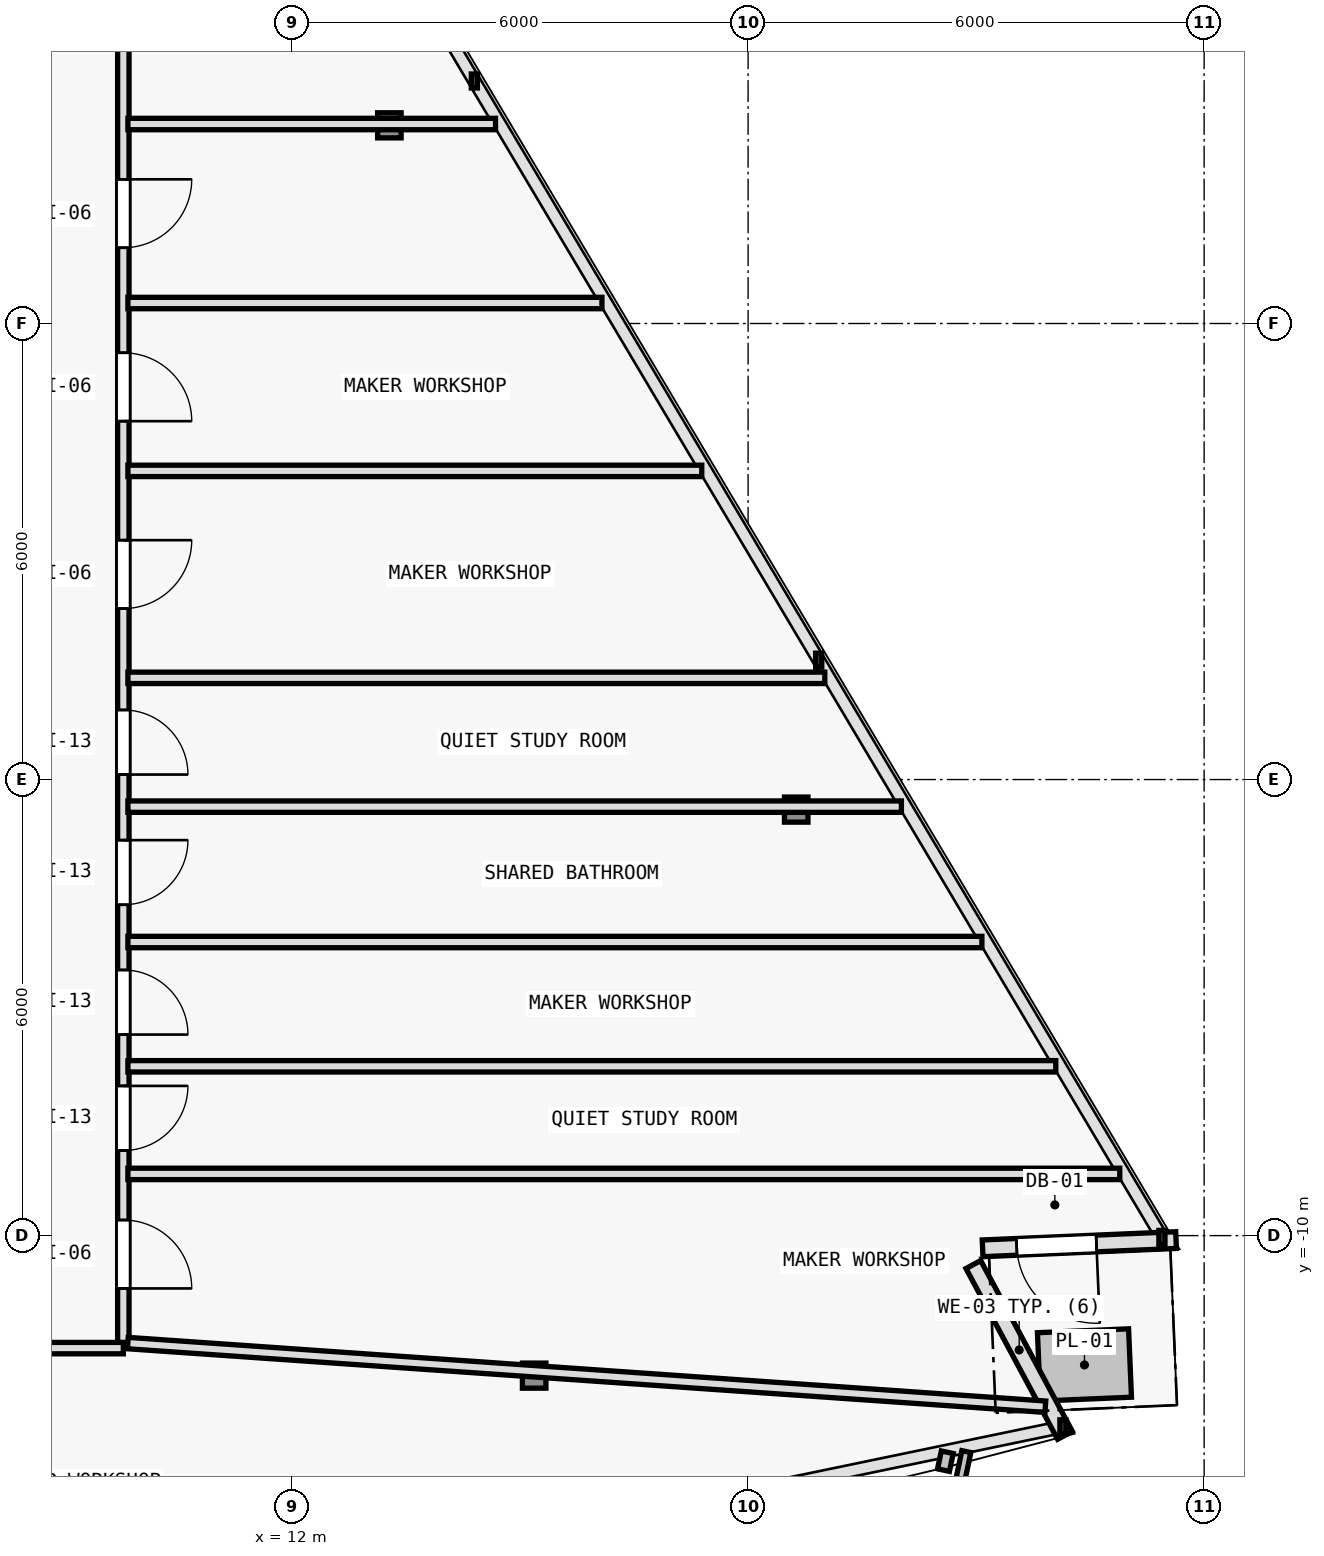
"""IFC4 building model, lengths in metres.
Left out: names, types, materials, properties, quantities, classifications, styles, units other than length and angle.
Written with IfcOpenShell. Run it as: python <this file> out.ifc"""

import sys

from ifc_helpers import new_model, si_unit, direction, frame, frame_2d, origin, origin_2d, place, context, subcontext, project, spatial, rectangle, i_section, extrude, element, fill, save


model = new_model("IFC4")
c1 = context("Model", 3, precision=1e-05, world=origin(), true_north=direction((0.0, 1.0)))
c2 = subcontext(c1, "Body", "Model", "MODEL_VIEW")
j1 = project(units=[si_unit("LENGTHUNIT", "METRE"), si_unit("PLANEANGLEUNIT", "RADIAN")], contexts=[c1])
p1 = place(None, origin())
s1 = spatial("IfcSite", under=j1, at=p1, CompositionType="ELEMENT")
p2 = place(p1, origin())
s2 = spatial("IfcBuilding", under=s1, at=p2, CompositionType="ELEMENT")
p3 = place(p2, frame((0.0, 0.0, 286.8)))
s3 = spatial("IfcBuildingStorey", under=s2, at=p3, CompositionType="ELEMENT", Elevation=286.8)
p4 = place(p3, frame((15.185, -11.842, 0.005), z_axis=(-0.020662834962, 0.033509136961, 0.999224792022), x_axis=(-0.851183725565, -0.524867855115, 0.0)))
e1 = element("IfcColumn", 1, at=p4, inside=s3, PredefinedType="COLUMN", context=c2, shape_type="SweptSolid", body=[
    extrude(i_section(OverallWidth=0.309, OverallDepth=0.33, WebThickness=0.011, FlangeThickness=0.019, FilletRadius=0.027, at=origin_2d()), origin(), (0.0, 0.0, 1.0), 3.592),
])
p5 = place(p3, frame((18.633, -4.395, 0.005), z_axis=(-0.026105663043, 0.021618752208, 0.999425396871), x_axis=(-0.637813971185, -0.770190455771, 0.0)))
e2 = element("IfcColumn", 2, at=p5, inside=s3, PredefinedType="COLUMN", context=c2, shape_type="SweptSolid", body=[
    extrude(i_section(OverallWidth=0.309, OverallDepth=0.33, WebThickness=0.011, FlangeThickness=0.019, FilletRadius=0.027, at=origin_2d()), origin(), (0.0, 0.0, 1.0), 3.591),
])
p6 = place(p3, frame((13.28, 4.607, 0.005), z_axis=(-0.018906041, 0.009521027842, 0.999775930718), x_axis=(-0.449781931574, -0.893138406984, 0.0)))
e3 = element("IfcColumn", 3, at=p6, inside=s3, PredefinedType="COLUMN", context=c2, shape_type="SweptSolid", body=[
    extrude(i_section(OverallWidth=0.309, OverallDepth=0.33, WebThickness=0.011, FlangeThickness=0.019, FilletRadius=0.027, at=origin_2d()), origin(), (0.0, 0.0, 1.0), 3.59),
])
p7 = place(p3, frame((20.964, -10.381, 0.0), z_axis=(0.0, 0.0, 1.0), x_axis=(0.472728849632, -0.881207940685, 0.0)))
e4 = element("IfcWall", 4, at=p7, inside=s3, PredefinedType="SOLIDWALL", context=c2, shape_type="SweptSolid", body=[
    extrude(rectangle(XDim=2.55, YDim=0.22, at=frame_2d((1.275, 0.0))), origin(), (0.0, 0.0, 1.0), 3.35),
])
p8 = place(p3, frame((23.631, -10.059, 0.0), z_axis=(0.0, 0.0, 1.0), x_axis=(-0.999098350703, -0.042455690107, 0.0)))
e5 = element("IfcWall", 5, at=p8, inside=s3, PredefinedType="SOLIDWALL", context=c2, shape_type="SweptSolid", body=[
    extrude(rectangle(XDim=2.547, YDim=0.22, at=frame_2d((1.274, 0.0))), origin(), (0.0, 0.0, 1.0), 3.35),
])
p9 = place(p8, frame((1.049, 0.0, 0.0)))
e6 = element("IfcOpeningElement", 6, at=p9, cuts=e5, PredefinedType="OPENING", context=c2, shape_type="SweptSolid", body=[
    extrude(rectangle(XDim=1.05, YDim=2.15, at=frame_2d((0.525, 1.075))), frame((0.0, 0.12, 0.0), z_axis=(0.0, -1.0, 0.0), x_axis=(1.0, 0.0, 0.0)), (0.0, 0.0, 1.0), 0.24),
])
p10 = place(p3, frame((9.78, 8.226, 0.0), z_axis=(0.0, 0.0, 1.0), x_axis=(0.0, -1.0, 0.0)))
e7 = element("IfcWall", 7, at=p10, inside=s3, PredefinedType="PARTITIONING", context=c2, shape_type="SweptSolid", body=[
    extrude(rectangle(XDim=19.706, YDim=0.15, at=frame_2d((9.853, 0.0))), origin(), (0.0, 0.0, 1.0), 2.825),
])
p11 = place(p10, frame((18.021, 0.0, 0.0)))
e8 = element("IfcOpeningElement", 8, at=p11, cuts=e7, PredefinedType="OPENING", context=c2, shape_type="SweptSolid", body=[
    extrude(rectangle(XDim=0.9, YDim=2.1, at=frame_2d((0.45, 1.05))), frame((0.0, 0.085, 0.0), z_axis=(0.0, -1.0, 0.0), x_axis=(1.0, 0.0, 0.0)), (0.0, 0.0, 1.0), 0.17),
])
p12 = place(p10, frame((16.256, 0.0, 0.0)))
e9 = element("IfcOpeningElement", 9, at=p12, cuts=e7, PredefinedType="OPENING", context=c2, shape_type="SweptSolid", body=[
    extrude(rectangle(XDim=0.85, YDim=2.1, at=frame_2d((0.425, 1.05))), frame((0.0, 0.085, 0.0), z_axis=(0.0, -1.0, 0.0), x_axis=(1.0, 0.0, 0.0)), (0.0, 0.0, 1.0), 0.17),
])
p13 = place(p10, frame((14.731, 0.0, 0.0)))
e10 = element("IfcOpeningElement", 10, at=p13, cuts=e7, PredefinedType="OPENING", context=c2, shape_type="SweptSolid", body=[
    extrude(rectangle(XDim=0.85, YDim=2.1, at=frame_2d((0.425, 1.05))), frame((0.0, 0.085, 0.0), z_axis=(0.0, -1.0, 0.0), x_axis=(1.0, 0.0, 0.0)), (0.0, 0.0, 1.0), 0.17),
])
p14 = place(p10, frame((13.023, 0.0, 0.0)))
e11 = element("IfcOpeningElement", 11, at=p14, cuts=e7, PredefinedType="OPENING", context=c2, shape_type="SweptSolid", body=[
    extrude(rectangle(XDim=0.85, YDim=2.1, at=frame_2d((0.425, 1.05))), frame((0.0, 0.085, 0.0), z_axis=(0.0, -1.0, 0.0), x_axis=(1.0, 0.0, 0.0)), (0.0, 0.0, 1.0), 0.17),
])
p15 = place(p10, frame((11.31, 0.0, 0.0)))
e12 = element("IfcOpeningElement", 12, at=p15, cuts=e7, PredefinedType="OPENING", context=c2, shape_type="SweptSolid", body=[
    extrude(rectangle(XDim=0.85, YDim=2.1, at=frame_2d((0.425, 1.05))), frame((0.0, 0.085, 0.0), z_axis=(0.0, -1.0, 0.0), x_axis=(1.0, 0.0, 0.0)), (0.0, 0.0, 1.0), 0.17),
])
p16 = place(p10, frame((9.076, 0.0, 0.0)))
e13 = element("IfcOpeningElement", 13, at=p16, cuts=e7, PredefinedType="OPENING", context=c2, shape_type="SweptSolid", body=[
    extrude(rectangle(XDim=0.9, YDim=2.1, at=frame_2d((0.45, 1.05))), frame((0.0, 0.085, 0.0), z_axis=(0.0, -1.0, 0.0), x_axis=(1.0, 0.0, 0.0)), (0.0, 0.0, 1.0), 0.17),
])
p17 = place(p10, frame((6.611, 0.0, 0.0)))
e14 = element("IfcOpeningElement", 14, at=p17, cuts=e7, PredefinedType="OPENING", context=c2, shape_type="SweptSolid", body=[
    extrude(rectangle(XDim=0.9, YDim=2.1, at=frame_2d((0.45, 1.05))), frame((0.0, 0.085, 0.0), z_axis=(0.0, -1.0, 0.0), x_axis=(1.0, 0.0, 0.0)), (0.0, 0.0, 1.0), 0.17),
])
p18 = place(p10, frame((4.329, 0.0, 0.0)))
e15 = element("IfcOpeningElement", 15, at=p18, cuts=e7, PredefinedType="OPENING", context=c2, shape_type="SweptSolid", body=[
    extrude(rectangle(XDim=0.9, YDim=2.1, at=frame_2d((0.45, 1.05))), frame((0.0, 0.085, 0.0), z_axis=(0.0, -1.0, 0.0), x_axis=(1.0, 0.0, 0.0)), (0.0, 0.0, 1.0), 0.17),
])
p19 = place(p3, frame((9.78, -11.48, 0.0), z_axis=(0.0, 0.0, 1.0), x_axis=(-1.0, 0.0, 0.0)))
e16 = element("IfcWall", 16, at=p19, inside=s3, PredefinedType="PARTITIONING", context=c2, shape_type="SweptSolid", body=[
    extrude(rectangle(XDim=19.56, YDim=0.15, at=frame_2d((9.78, 0.0))), origin(), (0.0, 0.0, 1.0), 2.965),
])
p20 = place(p19, frame((11.592, 0.0, 0.0)))
e17 = element("IfcOpeningElement", 17, at=p20, cuts=e16, PredefinedType="OPENING", context=c2, shape_type="SweptSolid", body=[
    extrude(rectangle(XDim=0.9, YDim=2.1, at=frame_2d((0.45, 1.05))), frame((0.0, 0.085, 0.0), z_axis=(0.0, -1.0, 0.0), x_axis=(1.0, 0.0, 0.0)), (0.0, 0.0, 1.0), 0.17),
])
p21 = place(p19, frame((1.991, 0.0, 0.0)))
e18 = element("IfcOpeningElement", 18, at=p21, cuts=e16, PredefinedType="OPENING", context=c2, shape_type="SweptSolid", body=[
    extrude(rectangle(XDim=0.9, YDim=2.1, at=frame_2d((0.45, 1.05))), frame((0.0, 0.085, 0.0), z_axis=(0.0, -1.0, 0.0), x_axis=(1.0, 0.0, 0.0)), (0.0, 0.0, 1.0), 0.17),
])
p22 = place(p3, frame((9.839, -11.414, 0.0), z_axis=(0.0, 0.0, 1.0), x_axis=(0.997602550349, -0.069203695979, 0.0)))
e19 = element("IfcWall", 19, at=p22, inside=s3, PredefinedType="PARTITIONING", context=c2, shape_type="SweptSolid", body=[
    extrude(rectangle(XDim=12.101, YDim=0.15, at=frame_2d((6.05, 0.0))), origin(), (0.0, 0.0, 1.0), 2.775),
])
p23 = place(p3, frame((9.84, -4.356, 0.0), z_axis=(0.0, 0.0, 1.0), x_axis=(1.0, 0.0, 0.0)))
e20 = element("IfcWall", 20, at=p23, inside=s3, PredefinedType="PARTITIONING", context=c2, shape_type="SweptSolid", body=[
    extrude(rectangle(XDim=10.177, YDim=0.15, at=frame_2d((5.088, 0.0))), origin(), (0.0, 0.0, 1.0), 2.775),
])
p24 = place(p3, frame((9.84, 4.624, 0.0), z_axis=(0.0, 0.0, 1.0), x_axis=(1.0, 0.0, 0.0)))
e21 = element("IfcWall", 21, at=p24, inside=s3, PredefinedType="PARTITIONING", context=c2, shape_type="SweptSolid", body=[
    extrude(rectangle(XDim=4.837, YDim=0.15, at=frame_2d((2.418, 0.0))), origin(), (0.0, 0.0, 1.0), 2.825),
])
p25 = place(p3, frame((9.84, -7.773, 0.0), z_axis=(0.0, 0.0, 1.0), x_axis=(1.0, 0.0, 0.0)))
e22 = element("IfcWall", 22, at=p25, inside=s3, PredefinedType="PARTITIONING", context=c2, shape_type="SweptSolid", body=[
    extrude(rectangle(XDim=12.208, YDim=0.15, at=frame_2d((6.104, 0.0))), origin(), (0.0, 0.0, 1.0), 2.875),
])
p26 = place(p3, frame((9.84, 0.061, 0.0), z_axis=(0.0, 0.0, 1.0), x_axis=(1.0, 0.0, 0.0)))
e23 = element("IfcWall", 23, at=p26, inside=s3, PredefinedType="PARTITIONING", context=c2, shape_type="SweptSolid", body=[
    extrude(rectangle(XDim=7.55, YDim=0.15, at=frame_2d((3.775, 0.0))), origin(), (0.0, 0.0, 1.0), 2.775),
])
p27 = place(p3, frame((9.84, -9.188, 0.0), z_axis=(0.0, 0.0, 1.0), x_axis=(1.0, 0.0, 0.0)))
e24 = element("IfcWall", 24, at=p27, inside=s3, PredefinedType="PARTITIONING", context=c2, shape_type="SweptSolid", body=[
    extrude(rectangle(XDim=13.05, YDim=0.15, at=frame_2d((6.525, 0.0))), origin(), (0.0, 0.0, 1.0), 3.015),
])
p28 = place(p3, frame((9.84, -6.138, 0.0), z_axis=(0.0, 0.0, 1.0), x_axis=(1.0, 0.0, 0.0)))
e25 = element("IfcWall", 25, at=p28, inside=s3, PredefinedType="PARTITIONING", context=c2, shape_type="SweptSolid", body=[
    extrude(rectangle(XDim=11.236, YDim=0.15, at=frame_2d((5.618, 0.0))), origin(), (0.0, 0.0, 1.0), 2.775),
])
p29 = place(p3, frame((9.84, -2.662, 0.0), z_axis=(0.0, 0.0, 1.0), x_axis=(1.0, 0.0, 0.0)))
e26 = element("IfcWall", 26, at=p29, inside=s3, PredefinedType="PARTITIONING", context=c2, shape_type="SweptSolid", body=[
    extrude(rectangle(XDim=9.169, YDim=0.15, at=frame_2d((4.584, 0.0))), origin(), (0.0, 0.0, 1.0), 2.775),
])
p30 = place(p3, frame((9.84, 2.269, 0.0), z_axis=(0.0, 0.0, 1.0), x_axis=(1.0, 0.0, 0.0)))
e27 = element("IfcWall", 27, at=p30, inside=s3, PredefinedType="PARTITIONING", context=c2, shape_type="SweptSolid", body=[
    extrude(rectangle(XDim=6.237, YDim=0.15, at=frame_2d((3.118, 0.0))), origin(), (0.0, 0.0, 1.0), 2.775),
])
p31 = place(p9, origin())
e28 = element("IfcDoor", 28, at=p31, inside=s3, OperationType="SINGLE_SWING_LEFT", PredefinedType="DOOR", context=c2, shape_type="SweptSolid", body=[
    extrude(rectangle(XDim=1.05, YDim=2.15, at=frame_2d((0.525, 1.075))), frame((0.0, 0.025, 0.0), z_axis=(0.0, -1.0, 0.0), x_axis=(1.0, 0.0, 0.0)), (0.0, 0.0, 1.0), 0.05),
])
fill(e6, e28)
p32 = place(p11, origin())
e29 = element("IfcDoor", 29, at=p32, inside=s3, OperationType="SINGLE_SWING_RIGHT", PredefinedType="DOOR", context=c2, shape_type="SweptSolid", body=[
    extrude(rectangle(XDim=0.9, YDim=2.1, at=frame_2d((0.45, 1.05))), frame((0.0, 0.025, 0.0), z_axis=(0.0, -1.0, 0.0), x_axis=(1.0, 0.0, 0.0)), (0.0, 0.0, 1.0), 0.05),
])
fill(e8, e29)
p33 = place(p12, origin())
e30 = element("IfcDoor", 30, at=p33, inside=s3, OperationType="SINGLE_SWING_LEFT", PredefinedType="DOOR", context=c2, shape_type="SweptSolid", body=[
    extrude(rectangle(XDim=0.85, YDim=2.1, at=frame_2d((0.425, 1.05))), frame((0.0, 0.025, 0.0), z_axis=(0.0, -1.0, 0.0), x_axis=(1.0, 0.0, 0.0)), (0.0, 0.0, 1.0), 0.05),
])
fill(e9, e30)
p34 = place(p13, origin())
e31 = element("IfcDoor", 31, at=p34, inside=s3, OperationType="SINGLE_SWING_RIGHT", PredefinedType="DOOR", context=c2, shape_type="SweptSolid", body=[
    extrude(rectangle(XDim=0.85, YDim=2.1, at=frame_2d((0.425, 1.05))), frame((0.0, 0.025, 0.0), z_axis=(0.0, -1.0, 0.0), x_axis=(1.0, 0.0, 0.0)), (0.0, 0.0, 1.0), 0.05),
])
fill(e10, e31)
p35 = place(p14, origin())
e32 = element("IfcDoor", 32, at=p35, inside=s3, OperationType="SINGLE_SWING_LEFT", PredefinedType="DOOR", context=c2, shape_type="SweptSolid", body=[
    extrude(rectangle(XDim=0.85, YDim=2.1, at=frame_2d((0.425, 1.05))), frame((0.0, 0.025, 0.0), z_axis=(0.0, -1.0, 0.0), x_axis=(1.0, 0.0, 0.0)), (0.0, 0.0, 1.0), 0.05),
])
fill(e11, e32)
p36 = place(p15, origin())
e33 = element("IfcDoor", 33, at=p36, inside=s3, OperationType="SINGLE_SWING_RIGHT", PredefinedType="DOOR", context=c2, shape_type="SweptSolid", body=[
    extrude(rectangle(XDim=0.85, YDim=2.1, at=frame_2d((0.425, 1.05))), frame((0.0, 0.025, 0.0), z_axis=(0.0, -1.0, 0.0), x_axis=(1.0, 0.0, 0.0)), (0.0, 0.0, 1.0), 0.05),
])
fill(e12, e33)
p37 = place(p16, origin())
e34 = element("IfcDoor", 34, at=p37, inside=s3, OperationType="SINGLE_SWING_LEFT", PredefinedType="DOOR", context=c2, shape_type="SweptSolid", body=[
    extrude(rectangle(XDim=0.9, YDim=2.1, at=frame_2d((0.45, 1.05))), frame((0.0, 0.025, 0.0), z_axis=(0.0, -1.0, 0.0), x_axis=(1.0, 0.0, 0.0)), (0.0, 0.0, 1.0), 0.05),
])
fill(e13, e34)
p38 = place(p17, origin())
e35 = element("IfcDoor", 35, at=p38, inside=s3, OperationType="SINGLE_SWING_RIGHT", PredefinedType="DOOR", context=c2, shape_type="SweptSolid", body=[
    extrude(rectangle(XDim=0.9, YDim=2.1, at=frame_2d((0.45, 1.05))), frame((0.0, 0.025, 0.0), z_axis=(0.0, -1.0, 0.0), x_axis=(1.0, 0.0, 0.0)), (0.0, 0.0, 1.0), 0.05),
])
fill(e14, e35)
p39 = place(p18, origin())
e36 = element("IfcDoor", 36, at=p39, inside=s3, OperationType="SINGLE_SWING_LEFT", PredefinedType="DOOR", context=c2, shape_type="SweptSolid", body=[
    extrude(rectangle(XDim=0.9, YDim=2.1, at=frame_2d((0.45, 1.05))), frame((0.0, 0.025, 0.0), z_axis=(0.0, -1.0, 0.0), x_axis=(1.0, 0.0, 0.0)), (0.0, 0.0, 1.0), 0.05),
])
fill(e15, e36)
save(model, sys.argv[1])
